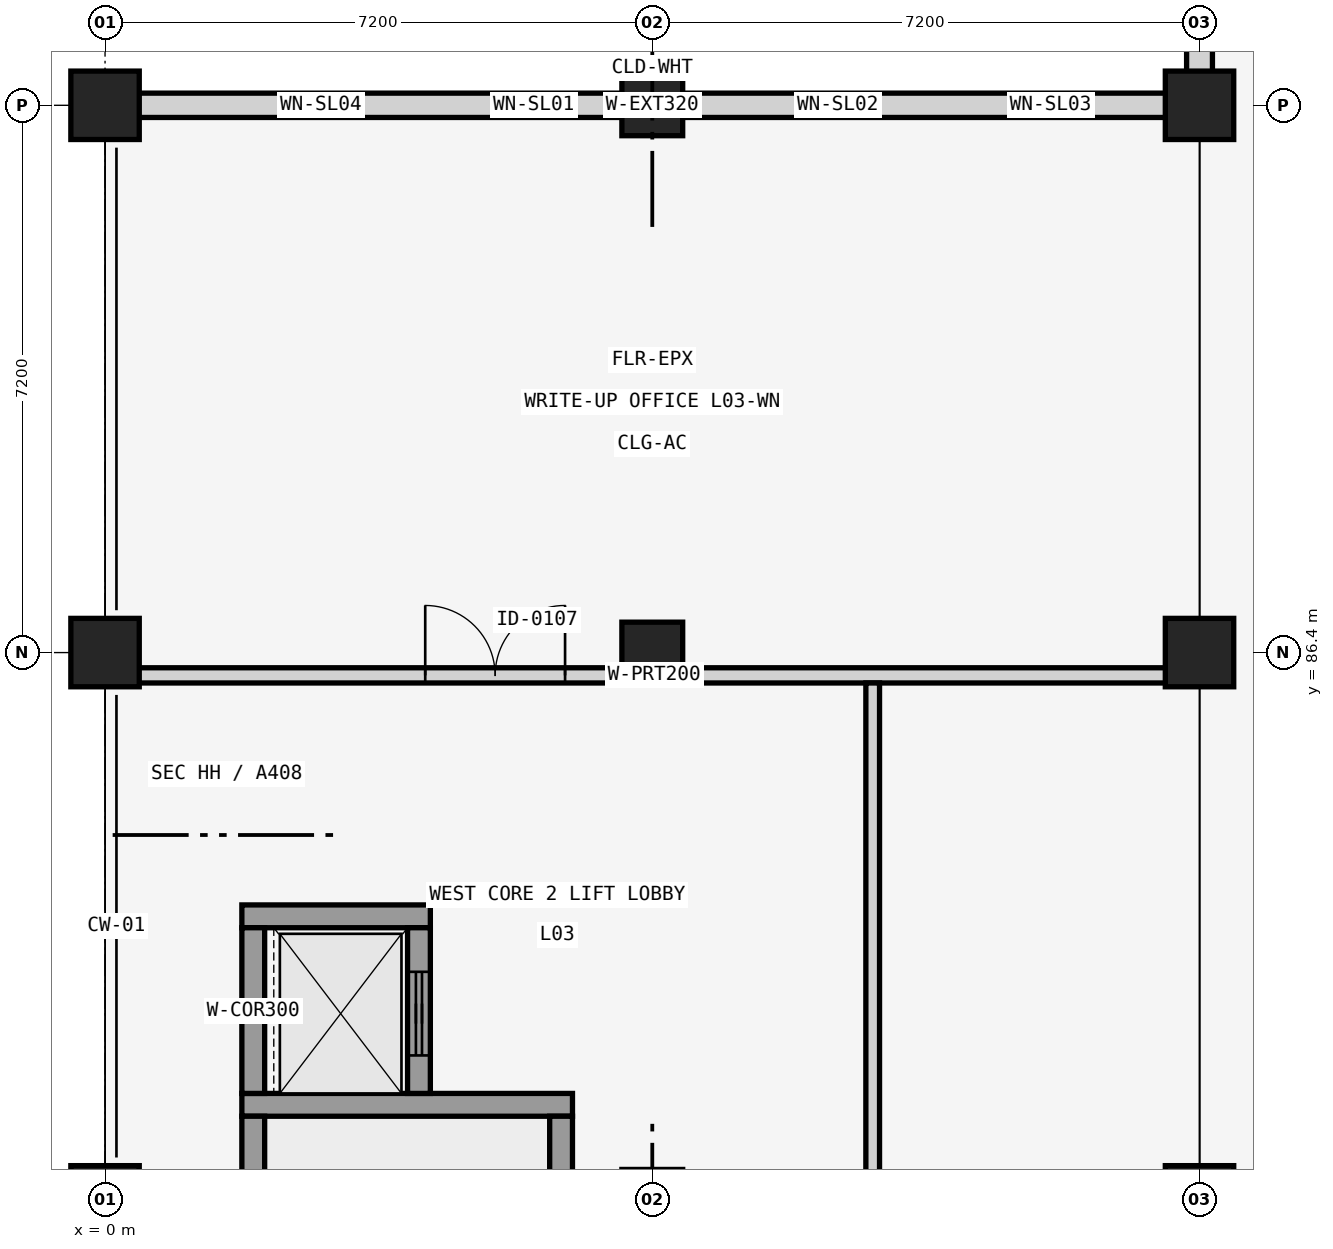
"""IFC4 building model, lengths in metres.
Left out: names, types, materials, properties, quantities, classifications, styles, units other than length and angle.
Written with IfcOpenShell. Run it as: python <this file> out.ifc"""

import sys

from ifc_helpers import new_model, si_unit, direction, frame, frame_2d, origin, origin_2d, place, context, subcontext, project, spatial, rectangle, extrude, element, fill, save


model = new_model("IFC4")
c1 = context("Model", 3, precision=1e-05, world=origin(), true_north=direction((0.0, 1.0)))
c2 = subcontext(c1, "Body", "Model", "MODEL_VIEW")
j1 = project(units=[si_unit("LENGTHUNIT", "METRE"), si_unit("PLANEANGLEUNIT", "RADIAN")], contexts=[c1])
p1 = place(None, origin())
s1 = spatial("IfcSite", under=j1, at=p1, CompositionType="ELEMENT")
p2 = place(p1, origin())
s2 = spatial("IfcBuilding", under=s1, at=p2, CompositionType="ELEMENT")
p3 = place(p2, frame((0.0, 0.0, 13.12)))
s3 = spatial("IfcBuildingStorey", under=s2, at=p3, CompositionType="ELEMENT", Elevation=13.12)
for number, where, z_axis, x_axis in (
    (1, (0.0, 79.2, 0.0), (0.0, 0.0, 1.0), (1.0, 0.0, 0.0)),
    (2, (0.0, 86.4, 0.0), (0.0, 0.0, 1.0), (1.0, 0.0, 0.0)),
    (3, (0.0, 93.6, 0.0), (0.0, 0.0, 1.0), (1.0, 0.0, 0.0)),
):
    element("IfcColumn", number, at=place(p3, frame(where, z_axis=z_axis, x_axis=x_axis)), inside=s3, PredefinedType="COLUMN", context=c2, shape_type="SweptSolid", body=[
        extrude(rectangle(XDim=0.9, YDim=0.9, at=origin_2d()), origin(), (0.0, 0.0, 1.0), 4.16),
    ])
for number, where, z_axis, x_axis in (
    (4, (7.2, 86.4, 0.0), (0.0, 0.0, 1.0), (1.0, 0.0, 0.0)),
    (5, (7.2, 93.6, 0.0), (0.0, 0.0, 1.0), (1.0, 0.0, 0.0)),
):
    element("IfcColumn", number, at=place(p3, frame(where, z_axis=z_axis, x_axis=x_axis)), inside=s3, PredefinedType="COLUMN", context=c2, shape_type="SweptSolid", body=[
        extrude(rectangle(XDim=0.8, YDim=0.8, at=origin_2d()), origin(), (0.0, 0.0, 1.0), 4.16),
    ])
for number, where, z_axis, x_axis in (
    (6, (14.4, 79.2, 0.0), (0.0, 0.0, 1.0), (1.0, 0.0, 0.0)),
    (7, (14.4, 86.4, 0.0), (0.0, 0.0, 1.0), (1.0, 0.0, 0.0)),
    (8, (14.4, 93.6, 0.0), (0.0, 0.0, 1.0), (1.0, 0.0, 0.0)),
):
    element("IfcColumn", number, at=place(p3, frame(where, z_axis=z_axis, x_axis=x_axis)), inside=s3, PredefinedType="COLUMN", context=c2, shape_type="SweptSolid", body=[
        extrude(rectangle(XDim=0.9, YDim=0.9, at=origin_2d()), origin(), (0.0, 0.0, 1.0), 4.16),
    ])
p4 = place(p3, frame((0.44, 93.6, 0.0), z_axis=(0.0, 0.0, 1.0), x_axis=(1.0, 0.0, 0.0)))
e9 = element("IfcWall", 9, at=p4, inside=s3, PredefinedType="SOLIDWALL", context=c2, shape_type="SweptSolid", body=[
    extrude(rectangle(XDim=13.52, YDim=0.32, at=frame_2d((6.76, 0.0))), origin(), (0.0, 0.0, 1.0), 3.42),
])
p5 = place(p4, frame((2.175, 0.0, 0.85)))
e10 = element("IfcOpeningElement", 10, at=p5, cuts=e9, PredefinedType="OPENING", context=c2, shape_type="SweptSolid", body=[
    extrude(rectangle(XDim=0.45, YDim=2.1, at=frame_2d((0.225, 1.05))), frame((0.0, 0.17, 0.0), z_axis=(0.0, -1.0, 0.0), x_axis=(1.0, 0.0, 0.0)), (0.0, 0.0, 1.0), 0.34),
])
p6 = place(p4, frame((4.975, 0.0, 0.85)))
e11 = element("IfcOpeningElement", 11, at=p6, cuts=e9, PredefinedType="OPENING", context=c2, shape_type="SweptSolid", body=[
    extrude(rectangle(XDim=0.45, YDim=2.4, at=frame_2d((0.225, 1.2))), frame((0.0, 0.17, 0.0), z_axis=(0.0, -1.0, 0.0), x_axis=(1.0, 0.0, 0.0)), (0.0, 0.0, 1.0), 0.34),
])
p7 = place(p4, frame((8.95, 0.0, 0.85)))
e12 = element("IfcOpeningElement", 12, at=p7, cuts=e9, PredefinedType="OPENING", context=c2, shape_type="SweptSolid", body=[
    extrude(rectangle(XDim=0.5, YDim=2.4, at=frame_2d((0.25, 1.2))), frame((0.0, 0.17, 0.0), z_axis=(0.0, -1.0, 0.0), x_axis=(1.0, 0.0, 0.0)), (0.0, 0.0, 1.0), 0.34),
])
p8 = place(p4, frame((11.725, 0.0, 0.85)))
e13 = element("IfcOpeningElement", 13, at=p8, cuts=e9, PredefinedType="OPENING", context=c2, shape_type="SweptSolid", body=[
    extrude(rectangle(XDim=0.55, YDim=2.2, at=frame_2d((0.275, 1.1))), frame((0.0, 0.17, 0.0), z_axis=(0.0, -1.0, 0.0), x_axis=(1.0, 0.0, 0.0)), (0.0, 0.0, 1.0), 0.34),
])
p9 = place(p3, frame((14.4, 94.04, 0.0), z_axis=(0.0, 0.0, 1.0), x_axis=(0.0, 1.0, 0.0)))
e14 = element("IfcWall", 14, at=p9, inside=s3, PredefinedType="SOLIDWALL", context=c2, shape_type="SweptSolid", body=[
    extrude(rectangle(XDim=6.47, YDim=0.34, at=frame_2d((3.235, 0.0))), origin(), (0.0, 0.0, 1.0), 3.21),
])
p10 = place(p9, frame((1.062, 0.0, 1.0)))
e15 = element("IfcOpeningElement", 15, at=p10, cuts=e14, PredefinedType="OPENING", context=c2, shape_type="SweptSolid", body=[
    extrude(rectangle(XDim=1.5, YDim=1.65, at=frame_2d((0.75, 0.825))), frame((0.0, 0.18, 0.0), z_axis=(0.0, -1.0, 0.0), x_axis=(1.0, 0.0, 0.0)), (0.0, 0.0, 1.0), 0.36),
])
p11 = place(p9, frame((3.608, 0.0, 1.0)))
e16 = element("IfcOpeningElement", 16, at=p11, cuts=e14, PredefinedType="OPENING", context=c2, shape_type="SweptSolid", body=[
    extrude(rectangle(XDim=2.1, YDim=1.65, at=frame_2d((1.05, 0.825))), frame((0.0, 0.18, 0.0), z_axis=(0.0, -1.0, 0.0), x_axis=(1.0, 0.0, 0.0)), (0.0, 0.0, 1.0), 0.36),
])
p12 = place(p3, frame((1.8, 80.45, 0.0), z_axis=(0.0, 0.0, 1.0), x_axis=(1.0, 0.0, 0.0)))
e17 = element("IfcWall", 17, at=p12, inside=s3, PredefinedType="SHEAR", context=c2, shape_type="SweptSolid", body=[
    extrude(rectangle(XDim=4.35, YDim=0.3, at=frame_2d((2.175, 0.0))), origin(), (0.0, 0.0, 1.0), 3.81),
])
p13 = place(p3, frame((1.95, 72.5, 0.0), z_axis=(0.0, 0.0, 1.0), x_axis=(0.0, 1.0, 0.0)))
e18 = element("IfcWall", 18, at=p13, inside=s3, PredefinedType="SHEAR", context=c2, shape_type="SweptSolid", body=[
    extrude(rectangle(XDim=7.8, YDim=0.3, at=frame_2d((3.9, 0.0))), origin(), (0.0, 0.0, 1.0), 3.81),
])
p14 = place(p3, frame((6.0, 72.5, 0.0), z_axis=(0.0, 0.0, 1.0), x_axis=(0.0, 1.0, 0.0)))
e19 = element("IfcWall", 19, at=p14, inside=s3, PredefinedType="SHEAR", context=c2, shape_type="SweptSolid", body=[
    extrude(rectangle(XDim=7.8, YDim=0.3, at=frame_2d((3.9, 0.0))), origin(), (0.0, 0.0, 1.0), 3.81),
])
p15 = place(p14, frame((0.4, 0.0, 0.0)))
e20 = element("IfcOpeningElement", 20, at=p15, cuts=e19, PredefinedType="OPENING", context=c2, shape_type="SweptSolid", body=[
    extrude(rectangle(XDim=1.15, YDim=2.2, at=frame_2d((0.575, 1.1))), frame((0.0, 0.16, 0.0), z_axis=(0.0, -1.0, 0.0), x_axis=(1.0, 0.0, 0.0)), (0.0, 0.0, 1.0), 0.32),
])
p16 = place(p3, frame((1.8, 82.93, 0.0), z_axis=(0.0, 0.0, 1.0), x_axis=(1.0, 0.0, 0.0)))
e21 = element("IfcWall", 21, at=p16, inside=s3, PredefinedType="SHEAR", context=c2, shape_type="SweptSolid", body=[
    extrude(rectangle(XDim=2.48, YDim=0.3, at=frame_2d((1.24, 0.0))), origin(), (0.0, 0.0, 1.0), 3.81),
])
p17 = place(p3, frame((1.95, 80.6, 0.0), z_axis=(0.0, 0.0, 1.0), x_axis=(0.0, 1.0, 0.0)))
e22 = element("IfcWall", 22, at=p17, inside=s3, PredefinedType="SHEAR", context=c2, shape_type="SweptSolid", body=[
    extrude(rectangle(XDim=2.18, YDim=0.3, at=frame_2d((1.09, 0.0))), origin(), (0.0, 0.0, 1.0), 3.81),
])
p18 = place(p3, frame((4.13, 80.6, 0.0), z_axis=(0.0, 0.0, 1.0), x_axis=(0.0, 1.0, 0.0)))
e23 = element("IfcWall", 23, at=p18, inside=s3, PredefinedType="SHEAR", context=c2, shape_type="SweptSolid", body=[
    extrude(rectangle(XDim=2.18, YDim=0.3, at=frame_2d((1.09, 0.0))), origin(), (0.0, 0.0, 1.0), 3.81),
])
p19 = place(p18, frame((0.5, 0.0, 0.0)))
e24 = element("IfcOpeningElement", 24, at=p19, cuts=e23, PredefinedType="OPENING", context=c2, shape_type="SweptSolid", body=[
    extrude(rectangle(XDim=1.1, YDim=2.2, at=frame_2d((0.55, 1.1))), frame((0.0, 0.16, 0.0), z_axis=(0.0, -1.0, 0.0), x_axis=(1.0, 0.0, 0.0)), (0.0, 0.0, 1.0), 0.32),
])
p20 = place(p3, frame((0.25, 86.1, 0.0), z_axis=(0.0, 0.0, 1.0), x_axis=(1.0, 0.0, 0.0)))
e25 = element("IfcWall", 25, at=p20, inside=s3, PredefinedType="PARTITIONING", context=c2, shape_type="SweptSolid", body=[
    extrude(rectangle(XDim=13.95, YDim=0.2, at=frame_2d((6.975, 0.0))), origin(), (0.0, 0.0, 1.0), 3.21),
])
p21 = place(p20, frame((3.962, 0.0, 0.0)))
e26 = element("IfcOpeningElement", 26, at=p21, cuts=e25, PredefinedType="OPENING", context=c2, shape_type="SweptSolid", body=[
    extrude(rectangle(XDim=1.84, YDim=2.26, at=frame_2d((0.92, 1.13))), frame((0.0, 0.11, 0.0), z_axis=(0.0, -1.0, 0.0), x_axis=(1.0, 0.0, 0.0)), (0.0, 0.0, 1.0), 0.22),
])
p22 = place(p3, frame((10.1, 66.475, 0.0), z_axis=(0.0, 0.0, 1.0), x_axis=(0.0, 1.0, 0.0)))
e27 = element("IfcWall", 27, at=p22, inside=s3, PredefinedType="PARTITIONING", context=c2, shape_type="SweptSolid", body=[
    extrude(rectangle(XDim=19.525, YDim=0.18, at=frame_2d((9.762, 0.0))), origin(), (0.0, 0.0, 1.0), 3.21),
])
p23 = place(p22, frame((9.137, 0.0, 0.0)))
e28 = element("IfcOpeningElement", 28, at=p23, cuts=e27, PredefinedType="OPENING", context=c2, shape_type="SweptSolid", body=[
    extrude(rectangle(XDim=1.25, YDim=2.2, at=frame_2d((0.625, 1.1))), frame((0.0, 0.1, 0.0), z_axis=(0.0, -1.0, 0.0), x_axis=(1.0, 0.0, 0.0)), (0.0, 0.0, 1.0), 0.2),
])
p24 = place(p5, origin())
e29 = element("IfcWindow", 29, at=p24, inside=s3, PartitioningType="SINGLE_PANEL", PredefinedType="WINDOW", context=c2, shape_type="SweptSolid", body=[
    extrude(rectangle(XDim=0.45, YDim=2.1, at=frame_2d((0.225, 1.05))), frame((0.0, 0.03, 0.0), z_axis=(0.0, -1.0, 0.0), x_axis=(1.0, 0.0, 0.0)), (0.0, 0.0, 1.0), 0.06),
])
fill(e10, e29)
p25 = place(p6, origin())
e30 = element("IfcWindow", 30, at=p25, inside=s3, PartitioningType="SINGLE_PANEL", PredefinedType="WINDOW", context=c2, shape_type="SweptSolid", body=[
    extrude(rectangle(XDim=0.45, YDim=2.4, at=frame_2d((0.225, 1.2))), frame((0.0, 0.03, 0.0), z_axis=(0.0, -1.0, 0.0), x_axis=(1.0, 0.0, 0.0)), (0.0, 0.0, 1.0), 0.06),
])
fill(e11, e30)
p26 = place(p7, origin())
e31 = element("IfcWindow", 31, at=p26, inside=s3, PartitioningType="SINGLE_PANEL", PredefinedType="WINDOW", context=c2, shape_type="SweptSolid", body=[
    extrude(rectangle(XDim=0.5, YDim=2.4, at=frame_2d((0.25, 1.2))), frame((0.0, 0.03, 0.0), z_axis=(0.0, -1.0, 0.0), x_axis=(1.0, 0.0, 0.0)), (0.0, 0.0, 1.0), 0.06),
])
fill(e12, e31)
p27 = place(p8, origin())
e32 = element("IfcWindow", 32, at=p27, inside=s3, PartitioningType="SINGLE_PANEL", PredefinedType="WINDOW", context=c2, shape_type="SweptSolid", body=[
    extrude(rectangle(XDim=0.55, YDim=2.2, at=frame_2d((0.275, 1.1))), frame((0.0, 0.03, 0.0), z_axis=(0.0, -1.0, 0.0), x_axis=(1.0, 0.0, 0.0)), (0.0, 0.0, 1.0), 0.06),
])
fill(e13, e32)
p28 = place(p19, origin())
e33 = element("IfcDoor", 33, at=p28, inside=s3, OperationType="SLIDING_TO_LEFT", PredefinedType="DOOR", context=c2, shape_type="SweptSolid", body=[
    extrude(rectangle(XDim=1.1, YDim=2.2, at=frame_2d((0.55, 1.1))), frame((0.0, 0.025, 0.0), z_axis=(0.0, -1.0, 0.0), x_axis=(1.0, 0.0, 0.0)), (0.0, 0.0, 1.0), 0.05),
])
fill(e24, e33)
p29 = place(p21, origin())
e34 = element("IfcDoor", 34, at=p29, inside=s3, OperationType="DOUBLE_DOOR_SINGLE_SWING", PredefinedType="DOOR", context=c2, shape_type="SweptSolid", body=[
    extrude(rectangle(XDim=1.84, YDim=2.26, at=frame_2d((0.92, 1.13))), frame((0.0, 0.025, 0.0), z_axis=(0.0, -1.0, 0.0), x_axis=(1.0, 0.0, 0.0)), (0.0, 0.0, 1.0), 0.05),
])
fill(e26, e34)
save(model, sys.argv[1])
